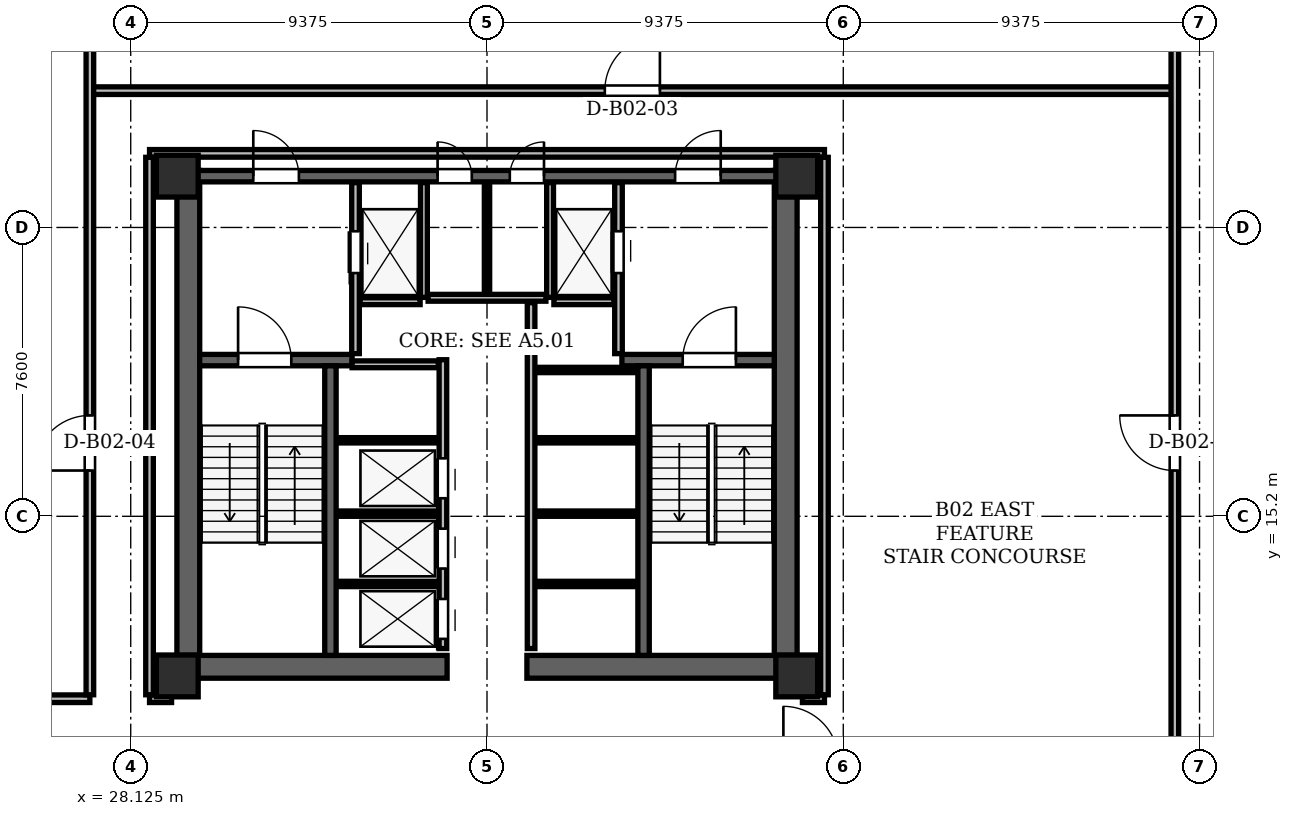
"""IFC4 building model, lengths in metres.
Left out: names, types, materials, properties, quantities, classifications, styles, units other than length and angle.
Written with IfcOpenShell. Run it as: python <this file> out.ifc"""

import sys

from ifc_helpers import new_model, si_unit, direction, frame, frame_2d, origin, origin_2d, place, context, subcontext, project, spatial, rectangle, hollow_rectangle, extrude, element, fill, save


model = new_model("IFC4")
c1 = context("Model", 3, precision=1e-05, world=origin(), true_north=direction((0.0, 1.0)))
c2 = subcontext(c1, "Body", "Model", "MODEL_VIEW")
j1 = project(units=[si_unit("LENGTHUNIT", "METRE"), si_unit("PLANEANGLEUNIT", "RADIAN")], contexts=[c1])
p1 = place(None, origin())
s1 = spatial("IfcSite", under=j1, at=p1, CompositionType="ELEMENT")
p2 = place(p1, origin())
s2 = spatial("IfcBuilding", under=s1, at=p2, CompositionType="ELEMENT")
p3 = place(p2, frame((0.0, 0.0, -8.0)))
s3 = spatial("IfcBuildingStorey", under=s2, at=p3, CompositionType="ELEMENT", Elevation=-8.0)
for number, where, z_axis, x_axis in (
    (1, (29.35, 11.0, 0.0), (0.0, 0.0, 1.0), (1.0, 0.0, 0.0)),
    (2, (45.65, 11.0, 0.0), (0.0, 0.0, 1.0), (1.0, 0.0, 0.0)),
    (3, (45.65, 24.15, 0.0), (0.0, 0.0, 1.0), (1.0, 0.0, 0.0)),
    (4, (29.35, 24.15, 0.0), (0.0, 0.0, 1.0), (1.0, 0.0, 0.0)),
):
    element("IfcColumn", number, at=place(p3, frame(where, z_axis=z_axis, x_axis=x_axis)), inside=s3, PredefinedType="COLUMN", context=c2, shape_type="SweptSolid", body=[
        extrude(hollow_rectangle(XDim=1.1, YDim=1.1, WallThickness=0.09, at=origin_2d()), origin(), (0.0, 0.0, 1.0), 4.0),
    ])
for number, where, z_axis, x_axis in (
    (5, (29.64, 11.0, 0.0), (0.0, 0.0, 1.0), (0.0, 1.0, 0.0)),
    (6, (45.36, 11.0, 0.0), (0.0, 0.0, 1.0), (0.0, 1.0, 0.0)),
):
    element("IfcWall", number, at=place(p3, frame(where, z_axis=z_axis, x_axis=x_axis)), inside=s3, PredefinedType="SHEAR", context=c2, shape_type="SweptSolid", body=[
        extrude(rectangle(XDim=13.3, YDim=0.6, at=frame_2d((6.65, 0.0))), origin(), (0.0, 0.0, 1.0), 3.72),
    ])
for number, where, z_axis, x_axis in (
    (7, (29.35, 11.24, 0.0), (0.0, 0.0, 1.0), (1.0, 0.0, 0.0)),
    (8, (38.55, 11.24, 0.0), (0.0, 0.0, 1.0), (1.0, 0.0, 0.0)),
):
    element("IfcWall", number, at=place(p3, frame(where, z_axis=z_axis, x_axis=x_axis)), inside=s3, PredefinedType="SHEAR", context=c2, shape_type="SweptSolid", body=[
        extrude(rectangle(XDim=7.1, YDim=0.6, at=frame_2d((3.55, 0.0))), origin(), (0.0, 0.0, 1.0), 3.72),
    ])
p4 = place(p3, frame((29.65, 24.15, 0.0), z_axis=(0.0, 0.0, 1.0), x_axis=(1.0, 0.0, 0.0)))
e9 = element("IfcWall", 9, at=p4, inside=s3, PredefinedType="SHEAR", context=c2, shape_type="SweptSolid", body=[
    extrude(rectangle(XDim=15.7, YDim=0.3, at=frame_2d((7.85, 0.0))), origin(), (0.0, 0.0, 1.0), 3.72),
])
p5 = place(p4, frame((1.7, 0.0, 0.0)))
e10 = element("IfcOpeningElement", 10, at=p5, cuts=e9, PredefinedType="OPENING", context=c2, shape_type="SweptSolid", body=[
    extrude(rectangle(XDim=1.2, YDim=2.2, at=frame_2d((0.6, 1.1))), frame((0.0, 0.15, 0.0), z_axis=(0.0, -1.0, 0.0), x_axis=(1.0, 0.0, 0.0)), (0.0, 0.0, 1.0), 0.3),
])
p6 = place(p4, frame((12.8, 0.0, 0.0)))
e11 = element("IfcOpeningElement", 11, at=p6, cuts=e9, PredefinedType="OPENING", context=c2, shape_type="SweptSolid", body=[
    extrude(rectangle(XDim=1.2, YDim=2.2, at=frame_2d((0.6, 1.1))), frame((0.0, 0.15, 0.0), z_axis=(0.0, -1.0, 0.0), x_axis=(1.0, 0.0, 0.0)), (0.0, 0.0, 1.0), 0.3),
])
p7 = place(p4, frame((6.55, 0.0, 0.0)))
e12 = element("IfcOpeningElement", 12, at=p7, cuts=e9, PredefinedType="OPENING", context=c2, shape_type="SweptSolid", body=[
    extrude(rectangle(XDim=0.9, YDim=2.05, at=frame_2d((0.45, 1.025))), frame((0.0, 0.15, 0.0), z_axis=(0.0, -1.0, 0.0), x_axis=(1.0, 0.0, 0.0)), (0.0, 0.0, 1.0), 0.3),
])
p8 = place(p4, frame((8.45, 0.0, 0.0)))
e13 = element("IfcOpeningElement", 13, at=p8, cuts=e9, PredefinedType="OPENING", context=c2, shape_type="SweptSolid", body=[
    extrude(rectangle(XDim=0.9, YDim=2.05, at=frame_2d((0.45, 1.025))), frame((0.0, 0.15, 0.0), z_axis=(0.0, -1.0, 0.0), x_axis=(1.0, 0.0, 0.0)), (0.0, 0.0, 1.0), 0.3),
])
p9 = place(p3, frame((29.94, 19.31, 0.0), z_axis=(0.0, 0.0, 1.0), x_axis=(1.0, 0.0, 0.0)))
e14 = element("IfcWall", 14, at=p9, inside=s3, PredefinedType="SHEAR", context=c2, shape_type="SweptSolid", body=[
    extrude(rectangle(XDim=4.01, YDim=0.3, at=frame_2d((2.005, 0.0))), origin(), (0.0, 0.0, 1.0), 3.72),
])
p10 = place(p9, frame((1.01, 0.0, 0.0)))
e15 = element("IfcOpeningElement", 15, at=p10, cuts=e14, PredefinedType="OPENING", context=c2, shape_type="SweptSolid", body=[
    extrude(rectangle(XDim=1.4, YDim=2.2, at=frame_2d((0.7, 1.1))), frame((0.0, 0.15, 0.0), z_axis=(0.0, -1.0, 0.0), x_axis=(1.0, 0.0, 0.0)), (0.0, 0.0, 1.0), 0.3),
])
p11 = place(p3, frame((41.05, 19.31, 0.0), z_axis=(0.0, 0.0, 1.0), x_axis=(1.0, 0.0, 0.0)))
e16 = element("IfcWall", 16, at=p11, inside=s3, PredefinedType="SHEAR", context=c2, shape_type="SweptSolid", body=[
    extrude(rectangle(XDim=4.01, YDim=0.3, at=frame_2d((2.005, 0.0))), origin(), (0.0, 0.0, 1.0), 3.72),
])
p12 = place(p11, frame((1.6, 0.0, 0.0)))
e17 = element("IfcOpeningElement", 17, at=p12, cuts=e16, PredefinedType="OPENING", context=c2, shape_type="SweptSolid", body=[
    extrude(rectangle(XDim=1.4, YDim=2.2, at=frame_2d((0.7, 1.1))), frame((0.0, 0.15, 0.0), z_axis=(0.0, -1.0, 0.0), x_axis=(1.0, 0.0, 0.0)), (0.0, 0.0, 1.0), 0.3),
])
for number, where, z_axis, x_axis in (
    (18, (33.38, 11.54, 0.0), (0.0, 0.0, 1.0), (0.0, 1.0, 0.0)),
    (19, (41.62, 11.54, 0.0), (0.0, 0.0, 1.0), (0.0, 1.0, 0.0)),
):
    element("IfcWall", number, at=place(p3, frame(where, z_axis=z_axis, x_axis=x_axis)), inside=s3, PredefinedType="SHEAR", context=c2, shape_type="SweptSolid", body=[
        extrude(rectangle(XDim=7.62, YDim=0.3, at=frame_2d((3.81, 0.0))), origin(), (0.0, 0.0, 1.0), 3.72),
    ])
p13 = place(p3, frame((34.04, 19.48, 0.0), z_axis=(0.0, 0.0, 1.0), x_axis=(0.0, 1.0, 0.0)))
e20 = element("IfcWall", 20, at=p13, inside=s3, PredefinedType="PARTITIONING", context=c2, shape_type="SweptSolid", body=[
    extrude(rectangle(XDim=4.5, YDim=0.2, at=frame_2d((2.25, 0.0))), origin(), (0.0, 0.0, 1.0), 2.76),
])
p14 = place(p13, frame((2.12, 0.0, 0.0)))
e21 = element("IfcOpeningElement", 21, at=p14, cuts=e20, PredefinedType="OPENING", context=c2, shape_type="SweptSolid", body=[
    extrude(rectangle(XDim=1.1, YDim=2.2, at=frame_2d((0.55, 1.1))), frame((0.0, 0.1, 0.0), z_axis=(0.0, -1.0, 0.0), x_axis=(1.0, 0.0, 0.0)), (0.0, 0.0, 1.0), 0.2),
])
p15 = place(p3, frame((35.84, 20.96, 0.0), z_axis=(0.0, 0.0, 1.0), x_axis=(0.0, 1.0, 0.0)))
e22 = element("IfcWall", 22, at=p15, inside=s3, PredefinedType="PARTITIONING", context=c2, shape_type="SweptSolid", body=[
    extrude(rectangle(XDim=3.02, YDim=0.18, at=frame_2d((1.51, 0.0))), origin(), (0.0, 0.0, 1.0), 2.76),
])
p16 = place(p3, frame((34.16, 20.86, 0.0), z_axis=(0.0, 0.0, 1.0), x_axis=(1.0, 0.0, 0.0)))
e23 = element("IfcWall", 23, at=p16, inside=s3, PredefinedType="PARTITIONING", context=c2, shape_type="SweptSolid", body=[
    extrude(rectangle(XDim=1.58, YDim=0.18, at=frame_2d((0.79, 0.0))), origin(), (0.0, 0.0, 1.0), 3.72),
])
p17 = place(p3, frame((40.96, 19.48, 0.0), z_axis=(0.0, 0.0, 1.0), x_axis=(0.0, 1.0, 0.0)))
e24 = element("IfcWall", 24, at=p17, inside=s3, PredefinedType="PARTITIONING", context=c2, shape_type="SweptSolid", body=[
    extrude(rectangle(XDim=4.5, YDim=0.2, at=frame_2d((2.25, 0.0))), origin(), (0.0, 0.0, 1.0), 2.76),
])
p18 = place(p17, frame((2.12, 0.0, 0.0)))
e25 = element("IfcOpeningElement", 25, at=p18, cuts=e24, PredefinedType="OPENING", context=c2, shape_type="SweptSolid", body=[
    extrude(rectangle(XDim=1.1, YDim=2.2, at=frame_2d((0.55, 1.1))), frame((0.0, 0.1, 0.0), z_axis=(0.0, -1.0, 0.0), x_axis=(1.0, 0.0, 0.0)), (0.0, 0.0, 1.0), 0.2),
])
p19 = place(p3, frame((39.16, 20.96, 0.0), z_axis=(0.0, 0.0, 1.0), x_axis=(0.0, 1.0, 0.0)))
e26 = element("IfcWall", 26, at=p19, inside=s3, PredefinedType="PARTITIONING", context=c2, shape_type="SweptSolid", body=[
    extrude(rectangle(XDim=3.02, YDim=0.18, at=frame_2d((1.51, 0.0))), origin(), (0.0, 0.0, 1.0), 2.76),
])
p20 = place(p3, frame((39.26, 20.86, 0.0), z_axis=(0.0, 0.0, 1.0), x_axis=(1.0, 0.0, 0.0)))
e27 = element("IfcWall", 27, at=p20, inside=s3, PredefinedType="PARTITIONING", context=c2, shape_type="SweptSolid", body=[
    extrude(rectangle(XDim=1.58, YDim=0.18, at=frame_2d((0.79, 0.0))), origin(), (0.0, 0.0, 1.0), 3.72),
])
p21 = place(p3, frame((36.34, 11.72, 0.0), z_axis=(0.0, 0.0, 1.0), x_axis=(0.0, 1.0, 0.0)))
e28 = element("IfcWall", 28, at=p21, inside=s3, PredefinedType="PARTITIONING", context=c2, shape_type="SweptSolid", body=[
    extrude(rectangle(XDim=7.6, YDim=0.2, at=frame_2d((3.8, 0.0))), origin(), (0.0, 0.0, 1.0), 3.72),
])
p22 = place(p21, frame((0.255, 0.0, 0.0)))
e29 = element("IfcOpeningElement", 29, at=p22, cuts=e28, PredefinedType="OPENING", context=c2, shape_type="SweptSolid", body=[
    extrude(rectangle(XDim=1.05, YDim=2.15, at=frame_2d((0.525, 1.075))), frame((0.0, 0.1, 0.0), z_axis=(0.0, -1.0, 0.0), x_axis=(1.0, 0.0, 0.0)), (0.0, 0.0, 1.0), 0.2),
])
p23 = place(p21, frame((2.105, 0.0, 0.0)))
e30 = element("IfcOpeningElement", 30, at=p23, cuts=e28, PredefinedType="OPENING", context=c2, shape_type="SweptSolid", body=[
    extrude(rectangle(XDim=1.05, YDim=2.15, at=frame_2d((0.525, 1.075))), frame((0.0, 0.1, 0.0), z_axis=(0.0, -1.0, 0.0), x_axis=(1.0, 0.0, 0.0)), (0.0, 0.0, 1.0), 0.2),
])
p24 = place(p21, frame((3.955, 0.0, 0.0)))
e31 = element("IfcOpeningElement", 31, at=p24, cuts=e28, PredefinedType="OPENING", context=c2, shape_type="SweptSolid", body=[
    extrude(rectangle(XDim=1.05, YDim=2.15, at=frame_2d((0.525, 1.075))), frame((0.0, 0.1, 0.0), z_axis=(0.0, -1.0, 0.0), x_axis=(1.0, 0.0, 0.0)), (0.0, 0.0, 1.0), 0.2),
])
p25 = place(p3, frame((33.95, 19.2, 0.0), z_axis=(0.0, 0.0, 1.0), x_axis=(1.0, 0.0, 0.0)))
e32 = element("IfcWall", 32, at=p25, inside=s3, PredefinedType="PARTITIONING", context=c2, shape_type="SweptSolid", body=[
    extrude(rectangle(XDim=2.27, YDim=0.18, at=frame_2d((1.135, 0.0))), origin(), (0.0, 0.0, 1.0), 3.72),
])
for number, where, z_axis, x_axis in (
    (33, (33.56, 13.42, 0.0), (0.0, 0.0, 1.0), (1.0, 0.0, 0.0)),
    (34, (33.56, 15.27, 0.0), (0.0, 0.0, 1.0), (1.0, 0.0, 0.0)),
    (35, (33.56, 17.2, 0.0), (0.0, 0.0, 1.0), (1.0, 0.0, 0.0)),
):
    element("IfcWall", number, at=place(p3, frame(where, z_axis=z_axis, x_axis=x_axis)), inside=s3, PredefinedType="PARTITIONING", context=c2, shape_type="SweptSolid", body=[
        extrude(rectangle(XDim=2.66, YDim=0.14, at=frame_2d((1.33, 0.0))), origin(), (0.0, 0.0, 1.0), 3.72),
    ])
p26 = place(p3, frame((38.66, 11.72, 0.0), z_axis=(0.0, 0.0, 1.0), x_axis=(0.0, 1.0, 0.0)))
e36 = element("IfcWall", 36, at=p26, inside=s3, PredefinedType="PARTITIONING", context=c2, shape_type="SweptSolid", body=[
    extrude(rectangle(XDim=9.1, YDim=0.2, at=frame_2d((4.55, 0.0))), origin(), (0.0, 0.0, 1.0), 3.72),
])
for number, where, z_axis, x_axis in (
    (37, (38.78, 13.42, 0.0), (0.0, 0.0, 1.0), (1.0, 0.0, 0.0)),
    (38, (38.78, 15.27, 0.0), (0.0, 0.0, 1.0), (1.0, 0.0, 0.0)),
    (39, (38.78, 17.2, 0.0), (0.0, 0.0, 1.0), (1.0, 0.0, 0.0)),
    (40, (38.78, 19.05, 0.0), (0.0, 0.0, 1.0), (1.0, 0.0, 0.0)),
):
    element("IfcWall", number, at=place(p3, frame(where, z_axis=z_axis, x_axis=x_axis)), inside=s3, PredefinedType="PARTITIONING", context=c2, shape_type="SweptSolid", body=[
        extrude(rectangle(XDim=2.66, YDim=0.14, at=frame_2d((1.33, 0.0))), origin(), (0.0, 0.0, 1.0), 3.72),
    ])
p27 = place(p3, frame((35.95, 20.95, 0.0), z_axis=(0.0, 0.0, 1.0), x_axis=(1.0, 0.0, 0.0)))
e41 = element("IfcWall", 41, at=p27, inside=s3, PredefinedType="PARTITIONING", context=c2, shape_type="SweptSolid", body=[
    extrude(rectangle(XDim=3.1, YDim=0.18, at=frame_2d((1.55, 0.0))), origin(), (0.0, 0.0, 1.0), 3.72),
])
p28 = place(p3, frame((37.5, 21.06, 0.0), z_axis=(0.0, 0.0, 1.0), x_axis=(0.0, 1.0, 0.0)))
e42 = element("IfcWall", 42, at=p28, inside=s3, PredefinedType="PARTITIONING", context=c2, shape_type="SweptSolid", body=[
    extrude(rectangle(XDim=2.92, YDim=0.14, at=frame_2d((1.46, 0.0))), origin(), (0.0, 0.0, 1.0), 2.76),
])
p29 = place(p3, frame((16.25, 10.4, 0.0), z_axis=(0.0, 0.0, 1.0), x_axis=(1.0, 0.0, 0.0)))
e43 = element("IfcWall", 43, at=p29, inside=s3, PredefinedType="PARTITIONING", context=c2, shape_type="SweptSolid", body=[
    extrude(rectangle(XDim=10.8, YDim=0.2, at=frame_2d((5.4, 0.0))), origin(), (0.0, 0.0, 1.0), 3.72),
])
for number, where, z_axis, x_axis in (
    (44, (28.62, 10.4, 0.0), (0.0, 0.0, 1.0), (1.0, 0.0, 0.0)),
    (45, (45.8, 10.4, 0.0), (0.0, 0.0, 1.0), (1.0, 0.0, 0.0)),
):
    element("IfcWall", number, at=place(p3, frame(where, z_axis=z_axis, x_axis=x_axis)), inside=s3, PredefinedType="PARTITIONING", context=c2, shape_type="SweptSolid", body=[
        extrude(rectangle(XDim=0.58, YDim=0.2, at=frame_2d((0.29, 0.0))), origin(), (0.0, 0.0, 1.0), 2.783),
    ])
p30 = place(p3, frame((28.62, 24.75, 0.0), z_axis=(0.0, 0.0, 1.0), x_axis=(1.0, 0.0, 0.0)))
e46 = element("IfcWall", 46, at=p30, inside=s3, PredefinedType="PARTITIONING", context=c2, shape_type="SweptSolid", body=[
    extrude(rectangle(XDim=17.76, YDim=0.2, at=frame_2d((8.88, 0.0))), origin(), (0.0, 0.0, 1.0), 2.783),
])
p31 = place(p3, frame((27.05, 26.4, 0.0), z_axis=(0.0, 0.0, 1.0), x_axis=(1.0, 0.0, 0.0)))
e47 = element("IfcWall", 47, at=p31, inside=s3, PredefinedType="PARTITIONING", context=c2, shape_type="SweptSolid", body=[
    extrude(rectangle(XDim=28.55, YDim=0.2, at=frame_2d((14.275, 0.0))), origin(), (0.0, 0.0, 1.0), 2.783),
])
p32 = place(p31, frame((13.55, 0.0, 0.0)))
e48 = element("IfcOpeningElement", 48, at=p32, cuts=e47, PredefinedType="OPENING", context=c2, shape_type="SweptSolid", body=[
    extrude(rectangle(XDim=1.45, YDim=2.25, at=frame_2d((0.725, 1.125))), frame((0.0, 0.1, 0.0), z_axis=(0.0, -1.0, 0.0), x_axis=(1.0, 0.0, 0.0)), (0.0, 0.0, 1.0), 0.2),
])
p33 = place(p3, frame((27.05, 10.504, 0.0), z_axis=(0.0, 0.0, 1.0), x_axis=(0.0, 1.0, 0.0)))
e49 = element("IfcWall", 49, at=p33, inside=s3, PredefinedType="PARTITIONING", context=c2, shape_type="SweptSolid", body=[
    extrude(rectangle(XDim=28.376, YDim=0.2, at=frame_2d((14.188, 0.0))), origin(), (0.0, 0.0, 1.0), 2.783),
])
p34 = place(p33, frame((5.9, 0.0, 0.0)))
e50 = element("IfcOpeningElement", 50, at=p34, cuts=e49, PredefinedType="OPENING", context=c2, shape_type="SweptSolid", body=[
    extrude(rectangle(XDim=1.45, YDim=2.25, at=frame_2d((0.725, 1.125))), frame((0.0, 0.1, 0.0), z_axis=(0.0, -1.0, 0.0), x_axis=(1.0, 0.0, 0.0)), (0.0, 0.0, 1.0), 0.2),
])
for number, where, z_axis, x_axis in (
    (51, (28.62, 10.504, 0.0), (0.0, 0.0, 1.0), (0.0, 1.0, 0.0)),
    (52, (46.38, 10.504, 0.0), (0.0, 0.0, 1.0), (0.0, 1.0, 0.0)),
):
    element("IfcWall", number, at=place(p3, frame(where, z_axis=z_axis, x_axis=x_axis)), inside=s3, PredefinedType="PARTITIONING", context=c2, shape_type="SweptSolid", body=[
        extrude(rectangle(XDim=14.142, YDim=0.2, at=frame_2d((7.071, 0.0))), origin(), (0.0, 0.0, 1.0), 2.783),
    ])
p35 = place(p3, frame((55.6, 1.679, 0.0), z_axis=(0.0, 0.0, 1.0), x_axis=(0.0, 1.0, 0.0)))
e53 = element("IfcWall", 53, at=p35, inside=s3, PredefinedType="PARTITIONING", context=c2, shape_type="SweptSolid", body=[
    extrude(rectangle(XDim=42.242, YDim=0.2, at=frame_2d((21.121, 0.0))), origin(), (0.0, 0.0, 1.0), 2.51),
])
p36 = place(p35, frame((14.725, 0.0, 0.0)))
e54 = element("IfcOpeningElement", 54, at=p36, cuts=e53, PredefinedType="OPENING", context=c2, shape_type="SweptSolid", body=[
    extrude(rectangle(XDim=1.45, YDim=2.25, at=frame_2d((0.725, 1.125))), frame((0.0, 0.1, 0.0), z_axis=(0.0, -1.0, 0.0), x_axis=(1.0, 0.0, 0.0)), (0.0, 0.0, 1.0), 0.2),
])
p37 = place(p14, origin())
e55 = element("IfcDoor", 55, at=p37, inside=s3, OperationType="SLIDING_TO_LEFT", PredefinedType="DOOR", context=c2, shape_type="SweptSolid", body=[
    extrude(rectangle(XDim=1.1, YDim=2.2, at=frame_2d((0.55, 1.1))), frame((0.0, 0.025, 0.0), z_axis=(0.0, -1.0, 0.0), x_axis=(1.0, 0.0, 0.0)), (0.0, 0.0, 1.0), 0.05),
])
fill(e21, e55)
p38 = place(p18, origin())
e56 = element("IfcDoor", 56, at=p38, inside=s3, OperationType="SLIDING_TO_RIGHT", PredefinedType="DOOR", context=c2, shape_type="SweptSolid", body=[
    extrude(rectangle(XDim=1.1, YDim=2.2, at=frame_2d((0.55, 1.1))), frame((0.0, 0.025, 0.0), z_axis=(0.0, -1.0, 0.0), x_axis=(1.0, 0.0, 0.0)), (0.0, 0.0, 1.0), 0.05),
])
fill(e25, e56)
p39 = place(p22, origin())
e57 = element("IfcDoor", 57, at=p39, inside=s3, OperationType="SLIDING_TO_LEFT", PredefinedType="DOOR", context=c2, shape_type="SweptSolid", body=[
    extrude(rectangle(XDim=1.05, YDim=2.15, at=frame_2d((0.525, 1.075))), frame((0.0, 0.025, 0.0), z_axis=(0.0, -1.0, 0.0), x_axis=(1.0, 0.0, 0.0)), (0.0, 0.0, 1.0), 0.05),
])
fill(e29, e57)
p40 = place(p23, origin())
e58 = element("IfcDoor", 58, at=p40, inside=s3, OperationType="SLIDING_TO_RIGHT", PredefinedType="DOOR", context=c2, shape_type="SweptSolid", body=[
    extrude(rectangle(XDim=1.05, YDim=2.15, at=frame_2d((0.525, 1.075))), frame((0.0, 0.025, 0.0), z_axis=(0.0, -1.0, 0.0), x_axis=(1.0, 0.0, 0.0)), (0.0, 0.0, 1.0), 0.05),
])
fill(e30, e58)
p41 = place(p24, origin())
e59 = element("IfcDoor", 59, at=p41, inside=s3, OperationType="SLIDING_TO_LEFT", PredefinedType="DOOR", context=c2, shape_type="SweptSolid", body=[
    extrude(rectangle(XDim=1.05, YDim=2.15, at=frame_2d((0.525, 1.075))), frame((0.0, 0.025, 0.0), z_axis=(0.0, -1.0, 0.0), x_axis=(1.0, 0.0, 0.0)), (0.0, 0.0, 1.0), 0.05),
])
fill(e31, e59)
p42 = place(p10, origin())
e60 = element("IfcDoor", 60, at=p42, inside=s3, OperationType="SINGLE_SWING_LEFT", PredefinedType="DOOR", context=c2, shape_type="SweptSolid", body=[
    extrude(rectangle(XDim=1.4, YDim=2.2, at=frame_2d((0.7, 1.1))), frame((0.0, 0.025, 0.0), z_axis=(0.0, -1.0, 0.0), x_axis=(1.0, 0.0, 0.0)), (0.0, 0.0, 1.0), 0.05),
])
fill(e15, e60)
p43 = place(p12, origin())
e61 = element("IfcDoor", 61, at=p43, inside=s3, OperationType="SINGLE_SWING_RIGHT", PredefinedType="DOOR", context=c2, shape_type="SweptSolid", body=[
    extrude(rectangle(XDim=1.4, YDim=2.2, at=frame_2d((0.7, 1.1))), frame((0.0, 0.025, 0.0), z_axis=(0.0, -1.0, 0.0), x_axis=(1.0, 0.0, 0.0)), (0.0, 0.0, 1.0), 0.05),
])
fill(e17, e61)
p44 = place(p5, origin())
e62 = element("IfcDoor", 62, at=p44, inside=s3, OperationType="SINGLE_SWING_LEFT", PredefinedType="DOOR", context=c2, shape_type="SweptSolid", body=[
    extrude(rectangle(XDim=1.2, YDim=2.2, at=frame_2d((0.6, 1.1))), frame((0.0, 0.025, 0.0), z_axis=(0.0, -1.0, 0.0), x_axis=(1.0, 0.0, 0.0)), (0.0, 0.0, 1.0), 0.05),
])
fill(e10, e62)
p45 = place(p6, origin())
e63 = element("IfcDoor", 63, at=p45, inside=s3, OperationType="SINGLE_SWING_RIGHT", PredefinedType="DOOR", context=c2, shape_type="SweptSolid", body=[
    extrude(rectangle(XDim=1.2, YDim=2.2, at=frame_2d((0.6, 1.1))), frame((0.0, 0.025, 0.0), z_axis=(0.0, -1.0, 0.0), x_axis=(1.0, 0.0, 0.0)), (0.0, 0.0, 1.0), 0.05),
])
fill(e11, e63)
p46 = place(p7, origin())
e64 = element("IfcDoor", 64, at=p46, inside=s3, OperationType="SINGLE_SWING_LEFT", PredefinedType="DOOR", context=c2, shape_type="SweptSolid", body=[
    extrude(rectangle(XDim=0.9, YDim=2.05, at=frame_2d((0.45, 1.025))), frame((0.0, 0.025, 0.0), z_axis=(0.0, -1.0, 0.0), x_axis=(1.0, 0.0, 0.0)), (0.0, 0.0, 1.0), 0.05),
])
fill(e12, e64)
p47 = place(p8, origin())
e65 = element("IfcDoor", 65, at=p47, inside=s3, OperationType="SINGLE_SWING_RIGHT", PredefinedType="DOOR", context=c2, shape_type="SweptSolid", body=[
    extrude(rectangle(XDim=0.9, YDim=2.05, at=frame_2d((0.45, 1.025))), frame((0.0, 0.025, 0.0), z_axis=(0.0, -1.0, 0.0), x_axis=(1.0, 0.0, 0.0)), (0.0, 0.0, 1.0), 0.05),
])
fill(e13, e65)
p48 = place(p32, origin())
e66 = element("IfcDoor", 66, at=p48, inside=s3, OperationType="SINGLE_SWING_RIGHT", PredefinedType="DOOR", context=c2, shape_type="SweptSolid", body=[
    extrude(rectangle(XDim=1.45, YDim=2.25, at=frame_2d((0.725, 1.125))), frame((0.0, 0.025, 0.0), z_axis=(0.0, -1.0, 0.0), x_axis=(1.0, 0.0, 0.0)), (0.0, 0.0, 1.0), 0.05),
])
fill(e48, e66)
p49 = place(p34, origin())
e67 = element("IfcDoor", 67, at=p49, inside=s3, OperationType="SINGLE_SWING_LEFT", PredefinedType="DOOR", context=c2, shape_type="SweptSolid", body=[
    extrude(rectangle(XDim=1.45, YDim=2.25, at=frame_2d((0.725, 1.125))), frame((0.0, 0.025, 0.0), z_axis=(0.0, -1.0, 0.0), x_axis=(1.0, 0.0, 0.0)), (0.0, 0.0, 1.0), 0.05),
])
fill(e50, e67)
p50 = place(p36, origin())
e68 = element("IfcDoor", 68, at=p50, inside=s3, OperationType="SINGLE_SWING_RIGHT", PredefinedType="DOOR", context=c2, shape_type="SweptSolid", body=[
    extrude(rectangle(XDim=1.45, YDim=2.25, at=frame_2d((0.725, 1.125))), frame((0.0, 0.025, 0.0), z_axis=(0.0, -1.0, 0.0), x_axis=(1.0, 0.0, 0.0)), (0.0, 0.0, 1.0), 0.05),
])
fill(e54, e68)
save(model, sys.argv[1])
